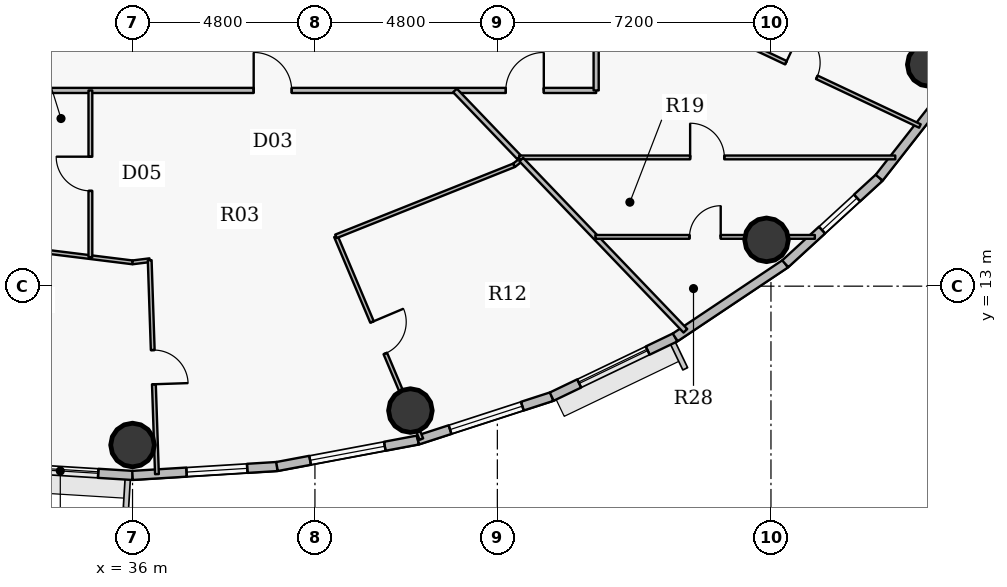
"""IFC4 building model, lengths in metres.
Left out: names, types, materials, properties, quantities, classifications, styles, units other than length and angle.
Written with IfcOpenShell. Run it as: python <this file> out.ifc"""

import sys

from ifc_helpers import new_model, si_unit, direction, frame, frame_2d, origin, origin_2d, place, context, subcontext, project, spatial, rectangle, hollow_circle, extrude, source, transform, mapped, element, fill, save


model = new_model("IFC4")
c1 = context("Model", 3, precision=1e-05, world=origin(), true_north=direction((0.0, 1.0)))
c2 = subcontext(c1, "Body", "Model", "MODEL_VIEW")
j1 = project(units=[si_unit("LENGTHUNIT", "METRE"), si_unit("PLANEANGLEUNIT", "RADIAN")], contexts=[c1])
p1 = place(None, origin())
s1 = spatial("IfcSite", under=j1, at=p1, CompositionType="ELEMENT")
p2 = place(p1, origin())
s2 = spatial("IfcBuilding", under=s1, at=p2, CompositionType="ELEMENT")
p3 = place(p2, frame((0.0, 0.0, 236.55)))
s3 = spatial("IfcBuildingStorey", under=s2, at=p3, CompositionType="ELEMENT", Elevation=236.55)
for number, where, z_axis, x_axis in (
    (1, (36.0, 8.82, 0.0), (0.0, 0.0, 1.0), (1.0, 0.0, 0.0)),
    (2, (43.312, 9.727, 0.0), (0.0, 0.0, 1.0), (1.0, 0.0, 0.0)),
    (3, (52.683, 14.219, 0.0), (0.0, 0.0, 1.0), (1.0, 0.0, 0.0)),
    (4, (56.965, 18.831, 0.0), (0.0, 0.0, 1.0), (1.0, 0.0, 0.0)),
):
    element("IfcColumn", number, at=place(p3, frame(where, z_axis=z_axis, x_axis=x_axis)), inside=s3, PredefinedType="COLUMN", context=c2, shape_type="SweptSolid", body=[
        extrude(hollow_circle(Radius=0.575, WallThickness=0.036, at=origin_2d()), origin(), (0.0, 0.0, 1.0), 3.75),
    ])
p4 = place(p3, frame((36.0, 8.02, 0.0), z_axis=(0.0, 0.0, 1.0), x_axis=(-0.998108785312, 0.06147237333, 0.0)))
e5 = element("IfcWall", 5, at=p4, inside=s3, PredefinedType="SOLIDWALL", context=c2, shape_type="SweptSolid", body=[
    extrude(rectangle(XDim=3.809, YDim=0.24, at=frame_2d((1.904, 0.0))), origin(), (0.0, 0.0, 1.0), 3.5),
])
p5 = place(p4, frame((0.904, 0.0, 0.9)))
e6 = element("IfcOpeningElement", 6, at=p5, cuts=e5, PredefinedType="OPENING", context=c2, shape_type="SweptSolid", body=[
    extrude(rectangle(XDim=2.0, YDim=1.75, at=origin_2d()), frame((1.0, 0.13, 0.875), z_axis=(0.0, -1.0, 0.0), x_axis=(1.0, 0.0, 0.0)), (0.0, 0.0, 1.0), 0.26),
])
p6 = place(p3, frame((39.802, 8.254, 0.0), z_axis=(0.0, 0.0, 1.0), x_axis=(-0.998108785312, -0.06147237333, 0.0)))
e7 = element("IfcWall", 7, at=p6, inside=s3, PredefinedType="SOLIDWALL", context=c2, shape_type="SweptSolid", body=[
    extrude(rectangle(XDim=3.809, YDim=0.24, at=frame_2d((1.904, 0.0))), origin(), (0.0, 0.0, 1.0), 3.5),
])
p7 = place(p6, frame((0.785, 0.0, 0.9)))
e8 = element("IfcOpeningElement", 8, at=p7, cuts=e7, PredefinedType="OPENING", context=c2, shape_type="SweptSolid", body=[
    extrude(rectangle(XDim=1.6, YDim=1.75, at=origin_2d()), frame((0.8, 0.13, 0.875), z_axis=(0.0, -1.0, 0.0), x_axis=(1.0, 0.0, 0.0)), (0.0, 0.0, 1.0), 0.26),
])
p8 = place(p3, frame((43.509, 8.951, 0.0), z_axis=(0.0, 0.0, 1.0), x_axis=(-0.982784898575, -0.184753465822, 0.0)))
e9 = element("IfcWall", 9, at=p8, inside=s3, PredefinedType="SOLIDWALL", context=c2, shape_type="SweptSolid", body=[
    extrude(rectangle(XDim=3.773, YDim=0.24, at=frame_2d((1.886, 0.0))), origin(), (0.0, 0.0, 1.0), 3.5),
])
p9 = place(p8, frame((0.886, 0.0, 0.9)))
e10 = element("IfcOpeningElement", 10, at=p9, cuts=e9, PredefinedType="OPENING", context=c2, shape_type="SweptSolid", body=[
    extrude(rectangle(XDim=2.0, YDim=1.75, at=origin_2d()), frame((1.0, 0.13, 0.875), z_axis=(0.0, -1.0, 0.0), x_axis=(1.0, 0.0, 0.0)), (0.0, 0.0, 1.0), 0.26),
])
p10 = place(p3, frame((47.031, 10.094, 0.0), z_axis=(0.0, 0.0, 1.0), x_axis=(-0.951210789182, -0.308541787354, 0.0)))
e11 = element("IfcWall", 11, at=p10, inside=s3, PredefinedType="SOLIDWALL", context=c2, shape_type="SweptSolid", body=[
    extrude(rectangle(XDim=3.702, YDim=0.24, at=frame_2d((1.851, 0.0))), origin(), (0.0, 0.0, 1.0), 3.5),
])
p11 = place(p10, frame((0.813, 0.0, 0.9)))
e12 = element("IfcOpeningElement", 12, at=p11, cuts=e11, PredefinedType="OPENING", context=c2, shape_type="SweptSolid", body=[
    extrude(rectangle(XDim=2.0, YDim=1.75, at=origin_2d()), frame((1.0, 0.13, 0.875), z_axis=(0.0, -1.0, 0.0), x_axis=(1.0, 0.0, 0.0)), (0.0, 0.0, 1.0), 0.26),
])
p12 = place(p3, frame((50.28, 11.652, 0.0), z_axis=(0.0, 0.0, 1.0), x_axis=(-0.901598104751, -0.432574684313, 0.0)))
e13 = element("IfcWall", 13, at=p12, inside=s3, PredefinedType="SOLIDWALL", context=c2, shape_type="SweptSolid", body=[
    extrude(rectangle(XDim=3.604, YDim=0.24, at=frame_2d((1.802, 0.0))), origin(), (0.0, 0.0, 1.0), 3.5),
])
p13 = place(p12, frame((0.802, 0.0, 0.9)))
e14 = element("IfcOpeningElement", 14, at=p13, cuts=e13, PredefinedType="OPENING", context=c2, shape_type="SweptSolid", body=[
    extrude(rectangle(XDim=2.0, YDim=1.75, at=origin_2d()), frame((1.0, 0.13, 0.875), z_axis=(0.0, -1.0, 0.0), x_axis=(1.0, 0.0, 0.0)), (0.0, 0.0, 1.0), 0.26),
])
p14 = place(p3, frame((53.176, 13.589, 0.0), z_axis=(0.0, 0.0, 1.0), x_axis=(-0.831262496074, -0.555880079352, 0.0)))
e15 = element("IfcWall", 15, at=p14, inside=s3, PredefinedType="SOLIDWALL", context=c2, shape_type="SweptSolid", body=[
    extrude(rectangle(XDim=3.484, YDim=0.24, at=frame_2d((1.742, 0.0))), origin(), (0.0, 0.0, 1.0), 3.5),
])
p15 = place(p3, frame((55.648, 15.855, 0.0), z_axis=(0.0, 0.0, 1.0), x_axis=(-0.737123922599, -0.675757591694, 0.0)))
e16 = element("IfcWall", 16, at=p15, inside=s3, PredefinedType="SOLIDWALL", context=c2, shape_type="SweptSolid", body=[
    extrude(rectangle(XDim=3.354, YDim=0.24, at=frame_2d((1.677, 0.0))), origin(), (0.0, 0.0, 1.0), 3.5),
])
p16 = place(p15, frame((0.791, 0.0, 0.9)))
e17 = element("IfcOpeningElement", 17, at=p16, cuts=e16, PredefinedType="OPENING", context=c2, shape_type="SweptSolid", body=[
    extrude(rectangle(XDim=1.25, YDim=1.65, at=origin_2d()), frame((0.625, 0.13, 0.825), z_axis=(0.0, -1.0, 0.0), x_axis=(1.0, 0.0, 0.0)), (0.0, 0.0, 1.0), 0.26),
])
p17 = place(p3, frame((57.636, 18.395, 0.0), z_axis=(0.0, 0.0, 1.0), x_axis=(-0.616312344705, -0.787501805562, 0.0)))
e18 = element("IfcWall", 18, at=p17, inside=s3, PredefinedType="SOLIDWALL", context=c2, shape_type="SweptSolid", body=[
    extrude(rectangle(XDim=3.225, YDim=0.24, at=frame_2d((1.612, 0.0))), origin(), (0.0, 0.0, 1.0), 3.5),
])
p18 = place(p3, frame((24.35, 18.15, 0.0), z_axis=(0.0, 0.0, 1.0), x_axis=(1.0, 0.0, 0.0)))
e19 = element("IfcWall", 19, at=p18, inside=s3, PredefinedType="PARTITIONING", context=c2, shape_type="SweptSolid", body=[
    extrude(rectangle(XDim=23.85, YDim=0.135, at=frame_2d((11.925, 0.0))), origin(), (0.0, 0.0, 1.0), 2.935),
])
p19 = place(p18, frame((14.838, 0.0, 0.0)))
e20 = element("IfcOpeningElement", 20, at=p19, cuts=e19, PredefinedType="OPENING", context=c2, shape_type="SweptSolid", body=[
    extrude(rectangle(XDim=1.0, YDim=2.15, at=origin_2d()), frame((0.5, 0.078, 1.075), z_axis=(0.0, -1.0, 0.0), x_axis=(1.0, 0.0, 0.0)), (0.0, 0.0, 1.0), 0.155),
])
p20 = place(p18, frame((21.472, 0.0, 0.0)))
e21 = element("IfcOpeningElement", 21, at=p20, cuts=e19, PredefinedType="OPENING", context=c2, shape_type="SweptSolid", body=[
    extrude(rectangle(XDim=1.0, YDim=2.15, at=origin_2d()), frame((0.5, 0.078, 1.075), z_axis=(0.0, -1.0, 0.0), x_axis=(1.0, 0.0, 0.0)), (0.0, 0.0, 1.0), 0.155),
])
p21 = place(p3, frame((30.722, 14.281, 0.0), z_axis=(0.0, 0.0, 1.0), x_axis=(0.992398864395, -0.123062967412, 0.0)))
e22 = element("IfcWall", 22, at=p21, inside=s3, PredefinedType="PARTITIONING", context=c2, shape_type="SweptSolid", body=[
    extrude(rectangle(XDim=5.319, YDim=0.1, at=frame_2d((2.659, 0.0))), origin(), (0.0, 0.0, 1.0), 2.935),
])
p22 = place(p3, frame((34.891, 13.764, 0.0), z_axis=(0.0, 0.0, 1.0), x_axis=(0.0, 1.0, 0.0)))
e23 = element("IfcWall", 23, at=p22, inside=s3, PredefinedType="PARTITIONING", context=c2, shape_type="SweptSolid", body=[
    extrude(rectangle(XDim=4.386, YDim=0.1, at=frame_2d((2.193, 0.0))), origin(), (0.0, 0.0, 1.0), 3.5),
])
p23 = place(p22, frame((1.743, 0.0, 0.0)))
e24 = element("IfcOpeningElement", 24, at=p23, cuts=e23, PredefinedType="OPENING", context=c2, shape_type="SweptSolid", body=[
    extrude(rectangle(XDim=0.9, YDim=2.1, at=origin_2d()), frame((0.45, 0.06, 1.05), z_axis=(0.0, -1.0, 0.0), x_axis=(1.0, 0.0, 0.0)), (0.0, 0.0, 1.0), 0.12),
])
p24 = place(p3, frame((36.0, 13.626, 0.0), z_axis=(0.0, 0.0, 1.0), x_axis=(0.992368340182, 0.123308869931, 0.0)))
e25 = element("IfcWall", 25, at=p24, inside=s3, PredefinedType="PARTITIONING", context=c2, shape_type="SweptSolid", body=[
    extrude(rectangle(XDim=0.455, YDim=0.1, at=frame_2d((0.228, 0.0))), origin(), (0.0, 0.0, 1.0), 2.935),
])
p25 = place(p3, frame((36.452, 13.683, 0.0), z_axis=(0.0, 0.0, 1.0), x_axis=(0.033903801357, -0.999425100872, 0.0)))
e26 = element("IfcWall", 26, at=p25, inside=s3, PredefinedType="PARTITIONING", context=c2, shape_type="SweptSolid", body=[
    extrude(rectangle(XDim=5.631, YDim=0.1, at=frame_2d((2.815, 0.0))), origin(), (0.0, 0.0, 1.0), 2.985),
])
p26 = place(p25, frame((2.365, 0.0, 0.0)))
e27 = element("IfcOpeningElement", 27, at=p26, cuts=e26, PredefinedType="OPENING", context=c2, shape_type="SweptSolid", body=[
    extrude(rectangle(XDim=0.9, YDim=2.1, at=origin_2d()), frame((0.45, 0.06, 1.05), z_axis=(0.0, -1.0, 0.0), x_axis=(1.0, 0.0, 0.0)), (0.0, 0.0, 1.0), 0.12),
])
p27 = place(p3, frame((41.352, 14.311, 0.0), z_axis=(0.0, 0.0, 1.0), x_axis=(0.388594226314, -0.921408990229, 0.0)))
e28 = element("IfcWall", 28, at=p27, inside=s3, PredefinedType="PARTITIONING", context=c2, shape_type="SweptSolid", body=[
    extrude(rectangle(XDim=5.79, YDim=0.1, at=frame_2d((2.895, 0.0))), origin(), (0.0, 0.0, 1.0), 2.935),
])
p28 = place(p27, frame((2.445, 0.0, 0.0)))
e29 = element("IfcOpeningElement", 29, at=p28, cuts=e28, PredefinedType="OPENING", context=c2, shape_type="SweptSolid", body=[
    extrude(rectangle(XDim=0.9, YDim=2.1, at=origin_2d()), frame((0.45, 0.06, 1.05), z_axis=(0.0, -1.0, 0.0), x_axis=(1.0, 0.0, 0.0)), (0.0, 0.0, 1.0), 0.12),
])
p29 = place(p3, frame((41.352, 14.311, 0.0), z_axis=(0.0, 0.0, 1.0), x_axis=(0.928803297531, 0.370573116261, 0.0)))
e30 = element("IfcWall", 30, at=p29, inside=s3, PredefinedType="PARTITIONING", context=c2, shape_type="SweptSolid", body=[
    extrude(rectangle(XDim=5.047, YDim=0.1, at=frame_2d((2.523, 0.0))), origin(), (0.0, 0.0, 1.0), 2.935),
])
p30 = place(p3, frame((44.485, 18.15, 0.0), z_axis=(0.0, 0.0, 1.0), x_axis=(0.692102956666, -0.72179879286, 0.0)))
e31 = element("IfcWall", 31, at=p30, inside=s3, PredefinedType="PARTITIONING", context=c2, shape_type="SweptSolid", body=[
    extrude(rectangle(XDim=2.442, YDim=0.135, at=frame_2d((1.221, 0.0))), origin(), (0.0, 0.0, 1.0), 3.5),
])
p31 = place(p3, frame((46.039, 16.181, 0.0), z_axis=(0.0, 0.0, 1.0), x_axis=(0.787611392409, 0.616172292909, 0.0)))
e32 = element("IfcWall", 32, at=p31, inside=s3, PredefinedType="PARTITIONING", context=c2, shape_type="SweptSolid", body=[
    extrude(rectangle(XDim=0.242, YDim=0.1, at=frame_2d((0.121, 0.0))), origin(), (0.0, 0.0, 1.0), 3.5),
])
p32 = place(p3, frame((46.175, 16.387, 0.0), z_axis=(0.0, 0.0, 1.0), x_axis=(1.0, 0.0, 0.0)))
e33 = element("IfcWall", 33, at=p32, inside=s3, PredefinedType="PARTITIONING", context=c2, shape_type="SweptSolid", body=[
    extrude(rectangle(XDim=9.896, YDim=0.1, at=frame_2d((4.948, 0.0))), origin(), (0.0, 0.0, 1.0), 2.935),
])
p33 = place(p32, frame((4.498, 0.0, 0.0)))
e34 = element("IfcOpeningElement", 34, at=p33, cuts=e33, PredefinedType="OPENING", context=c2, shape_type="SweptSolid", body=[
    extrude(rectangle(XDim=0.9, YDim=2.1, at=origin_2d()), frame((0.45, 0.06, 1.05), z_axis=(0.0, -1.0, 0.0), x_axis=(1.0, 0.0, 0.0)), (0.0, 0.0, 1.0), 0.12),
])
p34 = place(p3, frame((46.23, 16.33, 0.0), z_axis=(0.0, 0.0, 1.0), x_axis=(0.69206255942, -0.721837525935, 0.0)))
e35 = element("IfcWall", 35, at=p34, inside=s3, PredefinedType="PARTITIONING", context=c2, shape_type="SweptSolid", body=[
    extrude(rectangle(XDim=6.24, YDim=0.135, at=frame_2d((3.12, 0.0))), origin(), (0.0, 0.0, 1.0), 2.985),
])
p35 = place(p3, frame((48.179, 14.297, 0.0), z_axis=(0.0, 0.0, 1.0), x_axis=(1.0, 0.0, 0.0)))
e36 = element("IfcWall", 36, at=p35, inside=s3, PredefinedType="PARTITIONING", context=c2, shape_type="SweptSolid", body=[
    extrude(rectangle(XDim=5.776, YDim=0.1, at=frame_2d((2.888, 0.0))), origin(), (0.0, 0.0, 1.0), 2.935),
])
p36 = place(p35, frame((2.478, 0.0, 0.0)))
e37 = element("IfcOpeningElement", 37, at=p36, cuts=e36, PredefinedType="OPENING", context=c2, shape_type="SweptSolid", body=[
    extrude(rectangle(XDim=0.82, YDim=2.1, at=origin_2d()), frame((0.41, 0.06, 1.05), z_axis=(0.0, -1.0, 0.0), x_axis=(1.0, 0.0, 0.0)), (0.0, 0.0, 1.0), 0.12),
])
p37 = place(p3, frame((48.2, 18.15, 0.0), z_axis=(0.0, 0.0, 1.0), x_axis=(0.0, 1.0, 0.0)))
e38 = element("IfcWall", 38, at=p37, inside=s3, PredefinedType="PARTITIONING", context=c2, shape_type="SweptSolid", body=[
    extrude(rectangle(XDim=1.9, YDim=0.135, at=frame_2d((0.95, 0.0))), origin(), (0.0, 0.0, 1.0), 3.5),
])
p38 = place(p3, frame((50.482, 20.16, 0.0), z_axis=(0.0, 0.0, 1.0), x_axis=(0.904207257568, -0.42709394208, 0.0)))
e39 = element("IfcWall", 39, at=p38, inside=s3, PredefinedType="PARTITIONING", context=c2, shape_type="SweptSolid", body=[
    extrude(rectangle(XDim=6.897, YDim=0.1, at=frame_2d((3.448, 0.0))), origin(), (0.0, 0.0, 1.0), 2.985),
])
p39 = place(p38, frame((2.998, 0.0, 0.0)))
e40 = element("IfcOpeningElement", 40, at=p39, cuts=e39, PredefinedType="OPENING", context=c2, shape_type="SweptSolid", body=[
    extrude(rectangle(XDim=0.9, YDim=2.1, at=origin_2d()), frame((0.45, 0.06, 1.05), z_axis=(0.0, -1.0, 0.0), x_axis=(1.0, 0.0, 0.0)), (0.0, 0.0, 1.0), 0.12),
])
m1 = source(origin(), c2, "Body", "SweptSolid", [
    extrude(rectangle(XDim=2.0, YDim=1.75, at=origin_2d()), frame((1.0, 0.03, 0.875), z_axis=(0.0, -1.0, 0.0), x_axis=(1.0, 0.0, 0.0)), (0.0, 0.0, 1.0), 0.06),
])
p40 = place(p5, origin())
e41 = element("IfcWindow", 41, at=p40, inside=s3, PartitioningType="DOUBLE_PANEL_VERTICAL", PredefinedType="WINDOW", context=c2, shape_type="MappedRepresentation", body=[
    mapped(m1, transform((0.0, 0.0, 0.0), x_axis=(1.0, 0.0, 0.0), y_axis=(0.0, 1.0, 0.0), z_axis=(0.0, 0.0, 1.0), scale=1.0)),
])
fill(e6, e41)
m2 = source(origin(), c2, "Body", "SweptSolid", [
    extrude(rectangle(XDim=1.6, YDim=1.75, at=origin_2d()), frame((0.8, 0.03, 0.875), z_axis=(0.0, -1.0, 0.0), x_axis=(1.0, 0.0, 0.0)), (0.0, 0.0, 1.0), 0.06),
])
p41 = place(p7, origin())
e42 = element("IfcWindow", 42, at=p41, inside=s3, PartitioningType="DOUBLE_PANEL_VERTICAL", PredefinedType="WINDOW", context=c2, shape_type="MappedRepresentation", body=[
    mapped(m2, transform((0.0, 0.0, 0.0), x_axis=(1.0, 0.0, 0.0), y_axis=(0.0, 1.0, 0.0), z_axis=(0.0, 0.0, 1.0), scale=1.0)),
])
fill(e8, e42)
p42 = place(p9, origin())
e43 = element("IfcWindow", 43, at=p42, inside=s3, PartitioningType="DOUBLE_PANEL_VERTICAL", PredefinedType="WINDOW", context=c2, shape_type="MappedRepresentation", body=[
    mapped(m1, transform((0.0, 0.0, 0.0), x_axis=(1.0, 0.0, 0.0), y_axis=(0.0, 1.0, 0.0), z_axis=(0.0, 0.0, 1.0), scale=1.0)),
])
fill(e10, e43)
p43 = place(p11, origin())
e44 = element("IfcWindow", 44, at=p43, inside=s3, PartitioningType="DOUBLE_PANEL_VERTICAL", PredefinedType="WINDOW", context=c2, shape_type="MappedRepresentation", body=[
    mapped(m1, transform((0.0, 0.0, 0.0), x_axis=(1.0, 0.0, 0.0), y_axis=(0.0, 1.0, 0.0), z_axis=(0.0, 0.0, 1.0), scale=1.0)),
])
fill(e12, e44)
p44 = place(p13, origin())
e45 = element("IfcWindow", 45, at=p44, inside=s3, PartitioningType="DOUBLE_PANEL_VERTICAL", PredefinedType="WINDOW", context=c2, shape_type="MappedRepresentation", body=[
    mapped(m1, transform((0.0, 0.0, 0.0), x_axis=(1.0, 0.0, 0.0), y_axis=(0.0, 1.0, 0.0), z_axis=(0.0, 0.0, 1.0), scale=1.0)),
])
fill(e14, e45)
m3 = source(origin(), c2, "Body", "SweptSolid", [
    extrude(rectangle(XDim=1.25, YDim=1.65, at=origin_2d()), frame((0.625, 0.03, 0.825), z_axis=(0.0, -1.0, 0.0), x_axis=(1.0, 0.0, 0.0)), (0.0, 0.0, 1.0), 0.06),
])
p45 = place(p16, origin())
e46 = element("IfcWindow", 46, at=p45, inside=s3, PartitioningType="SINGLE_PANEL", PredefinedType="WINDOW", context=c2, shape_type="MappedRepresentation", body=[
    mapped(m3, transform((0.0, 0.0, 0.0), x_axis=(1.0, 0.0, 0.0), y_axis=(0.0, 1.0, 0.0), z_axis=(0.0, 0.0, 1.0), scale=1.0)),
])
fill(e17, e46)
m4 = source(origin(), c2, "Body", "SweptSolid", [
    extrude(rectangle(XDim=1.0, YDim=2.15, at=origin_2d()), frame((0.5, 0.025, 1.075), z_axis=(0.0, -1.0, 0.0), x_axis=(1.0, 0.0, 0.0)), (0.0, 0.0, 1.0), 0.05),
])
p46 = place(p19, origin())
e47 = element("IfcDoor", 47, at=p46, inside=s3, OperationType="SINGLE_SWING_LEFT", PredefinedType="DOOR", context=c2, shape_type="MappedRepresentation", body=[
    mapped(m4, transform((0.0, 0.0, 0.0), x_axis=(1.0, 0.0, 0.0), y_axis=(0.0, 1.0, 0.0), z_axis=(0.0, 0.0, 1.0), scale=1.0)),
])
fill(e20, e47)
m5 = source(origin(), c2, "Body", "SweptSolid", [
    extrude(rectangle(XDim=0.9, YDim=2.1, at=origin_2d()), frame((0.45, 0.025, 1.05), z_axis=(0.0, -1.0, 0.0), x_axis=(1.0, 0.0, 0.0)), (0.0, 0.0, 1.0), 0.05),
])
p47 = place(p26, origin())
e48 = element("IfcDoor", 48, at=p47, inside=s3, OperationType="SINGLE_SWING_RIGHT", PredefinedType="DOOR", context=c2, shape_type="MappedRepresentation", body=[
    mapped(m5, transform((0.0, 0.0, 0.0), x_axis=(1.0, 0.0, 0.0), y_axis=(0.0, 1.0, 0.0), z_axis=(0.0, 0.0, 1.0), scale=1.0)),
])
fill(e27, e48)
p48 = place(p28, origin())
e49 = element("IfcDoor", 49, at=p48, inside=s3, OperationType="SINGLE_SWING_LEFT", PredefinedType="DOOR", context=c2, shape_type="MappedRepresentation", body=[
    mapped(m5, transform((0.0, 0.0, 0.0), x_axis=(1.0, 0.0, 0.0), y_axis=(0.0, 1.0, 0.0), z_axis=(0.0, 0.0, 1.0), scale=1.0)),
])
fill(e29, e49)
p49 = place(p23, origin())
e50 = element("IfcDoor", 50, at=p49, inside=s3, OperationType="SINGLE_SWING_RIGHT", PredefinedType="DOOR", context=c2, shape_type="MappedRepresentation", body=[
    mapped(m5, transform((0.0, 0.0, 0.0), x_axis=(1.0, 0.0, 0.0), y_axis=(0.0, 1.0, 0.0), z_axis=(0.0, 0.0, 1.0), scale=1.0)),
])
fill(e24, e50)
p50 = place(p20, origin())
e51 = element("IfcDoor", 51, at=p50, inside=s3, OperationType="SINGLE_SWING_RIGHT", PredefinedType="DOOR", context=c2, shape_type="MappedRepresentation", body=[
    mapped(m4, transform((0.0, 0.0, 0.0), x_axis=(1.0, 0.0, 0.0), y_axis=(0.0, 1.0, 0.0), z_axis=(0.0, 0.0, 1.0), scale=1.0)),
])
fill(e21, e51)
p51 = place(p39, origin())
e52 = element("IfcDoor", 52, at=p51, inside=s3, OperationType="SINGLE_SWING_LEFT", PredefinedType="DOOR", context=c2, shape_type="MappedRepresentation", body=[
    mapped(m5, transform((0.0, 0.0, 0.0), x_axis=(1.0, 0.0, 0.0), y_axis=(0.0, 1.0, 0.0), z_axis=(0.0, 0.0, 1.0), scale=1.0)),
])
fill(e40, e52)
p52 = place(p33, origin())
e53 = element("IfcDoor", 53, at=p52, inside=s3, OperationType="SINGLE_SWING_LEFT", PredefinedType="DOOR", context=c2, shape_type="MappedRepresentation", body=[
    mapped(m5, transform((0.0, 0.0, 0.0), x_axis=(1.0, 0.0, 0.0), y_axis=(0.0, 1.0, 0.0), z_axis=(0.0, 0.0, 1.0), scale=1.0)),
])
fill(e34, e53)
m6 = source(origin(), c2, "Body", "SweptSolid", [
    extrude(rectangle(XDim=0.82, YDim=2.1, at=origin_2d()), frame((0.41, 0.025, 1.05), z_axis=(0.0, -1.0, 0.0), x_axis=(1.0, 0.0, 0.0)), (0.0, 0.0, 1.0), 0.05),
])
p53 = place(p36, origin())
e54 = element("IfcDoor", 54, at=p53, inside=s3, OperationType="SINGLE_SWING_RIGHT", PredefinedType="DOOR", context=c2, shape_type="MappedRepresentation", body=[
    mapped(m6, transform((0.0, 0.0, 0.0), x_axis=(1.0, 0.0, 0.0), y_axis=(0.0, 1.0, 0.0), z_axis=(0.0, 0.0, 1.0), scale=1.0)),
])
fill(e37, e54)
save(model, sys.argv[1])
